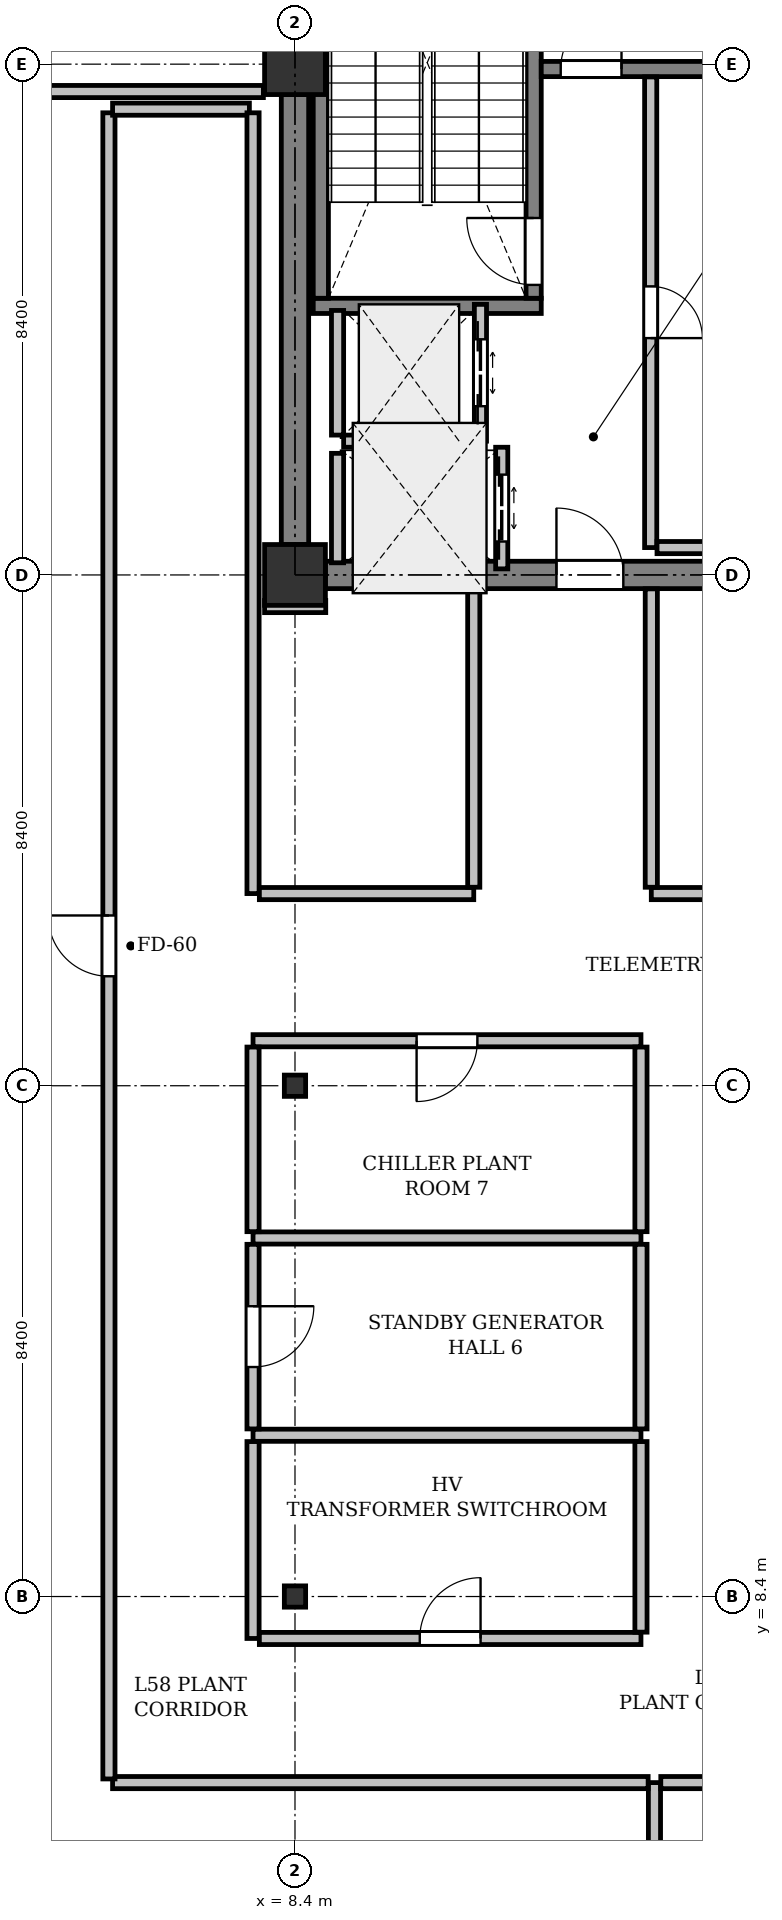
"""IFC4 building model, lengths in metres.
Left out: names, types, materials, properties, quantities, classifications, styles, units other than length and angle.
Written with IfcOpenShell. Run it as: python <this file> out.ifc"""

import sys

from ifc_helpers import new_model, si_unit, direction, frame, frame_2d, origin, origin_2d, place, context, subcontext, project, spatial, rectangle, i_section, extrude, element, fill, save


model = new_model("IFC4")
c1 = context("Model", 3, precision=1e-05, world=origin(), true_north=direction((0.0, 1.0)))
c2 = subcontext(c1, "Body", "Model", "MODEL_VIEW")
j1 = project(units=[si_unit("LENGTHUNIT", "METRE"), si_unit("PLANEANGLEUNIT", "RADIAN")], contexts=[c1])
p1 = place(None, origin())
s1 = spatial("IfcSite", under=j1, at=p1, CompositionType="ELEMENT")
p2 = place(p1, origin())
s2 = spatial("IfcBuilding", under=s1, at=p2, CompositionType="ELEMENT")
p3 = place(p2, frame((0.0, 0.0, 245.2)))
s3 = spatial("IfcBuildingStorey", under=s2, at=p3, CompositionType="ELEMENT", Elevation=245.2)
for number, where, z_axis, x_axis in (
    (1, (8.4, 8.4, 0.0), (0.0, 0.0, 1.0), (1.0, 0.0, 0.0)),
    (2, (8.4, 16.8, 0.0), (0.0, 0.0, 1.0), (1.0, 0.0, 0.0)),
):
    element("IfcColumn", number, at=place(p3, frame(where, z_axis=z_axis, x_axis=x_axis)), inside=s3, PredefinedType="COLUMN", context=c2, shape_type="SweptSolid", body=[
        extrude(i_section(OverallWidth=0.35, OverallDepth=0.35, WebThickness=0.02, FlangeThickness=0.032, at=origin_2d()), origin(), (0.0, 0.0, 1.0), 5.0),
    ])
for number, where, z_axis, x_axis in (
    (3, (8.4, 25.2, 0.0), (0.0, 0.0, 1.0), (1.0, 0.0, 0.0)),
    (4, (8.4, 33.6, 0.0), (0.0, 0.0, 1.0), (1.0, 0.0, 0.0)),
):
    element("IfcColumn", number, at=place(p3, frame(where, z_axis=z_axis, x_axis=x_axis)), inside=s3, PredefinedType="COLUMN", context=c2, shape_type="SweptSolid", body=[
        extrude(rectangle(XDim=1.0, YDim=1.0, at=origin_2d()), origin(), (0.0, 0.0, 1.0), 5.0),
    ])
p4 = place(p3, frame((8.4, 25.7, 0.0), z_axis=(0.0, 0.0, 1.0), x_axis=(0.0, 1.0, 0.0)))
e5 = element("IfcWall", 5, at=p4, inside=s3, PredefinedType="SHEAR", context=c2, shape_type="SweptSolid", body=[
    extrude(rectangle(XDim=7.4, YDim=0.45, at=frame_2d((3.7, 0.0))), origin(), (0.0, 0.0, 1.0), 4.725),
])
p5 = place(p3, frame((8.9, 25.2, 0.0), z_axis=(0.0, 0.0, 1.0), x_axis=(1.0, 0.0, 0.0)))
e6 = element("IfcWall", 6, at=p5, inside=s3, PredefinedType="SHEAR", context=c2, shape_type="SweptSolid", body=[
    extrude(rectangle(XDim=7.4, YDim=0.45, at=frame_2d((3.7, 0.0))), origin(), (0.0, 0.0, 1.0), 4.725),
])
p6 = place(p5, frame((3.8, 0.0, 0.0)))
e7 = element("IfcOpeningElement", 7, at=p6, cuts=e6, PredefinedType="OPENING", context=c2, shape_type="SweptSolid", body=[
    extrude(rectangle(XDim=1.1, YDim=2.15, at=frame_2d((0.55, 1.075))), frame((0.0, 0.235, 0.0), z_axis=(0.0, -1.0, 0.0), x_axis=(1.0, 0.0, 0.0)), (0.0, 0.0, 1.0), 0.47),
])
p7 = place(p3, frame((12.45, 29.625, 0.0), z_axis=(0.0, 0.0, 1.0), x_axis=(-1.0, 0.0, 0.0)))
e8 = element("IfcWall", 8, at=p7, inside=s3, PredefinedType="SHEAR", context=c2, shape_type="SweptSolid", body=[
    extrude(rectangle(XDim=3.75, YDim=0.25, at=frame_2d((1.875, 0.0))), origin(), (0.0, 0.0, 1.0), 4.725),
])
p8 = place(p3, frame((12.325, 29.75, 0.0), z_axis=(0.0, 0.0, 1.0), x_axis=(0.0, 1.0, 0.0)))
e9 = element("IfcWall", 9, at=p8, inside=s3, PredefinedType="SHEAR", context=c2, shape_type="SweptSolid", body=[
    extrude(rectangle(XDim=7.75, YDim=0.25, at=frame_2d((3.875, 0.0))), origin(), (0.0, 0.0, 1.0), 4.725),
])
p9 = place(p8, frame((0.22, 0.0, 0.0)))
e10 = element("IfcOpeningElement", 10, at=p9, cuts=e9, PredefinedType="OPENING", context=c2, shape_type="SweptSolid", body=[
    extrude(rectangle(XDim=1.1, YDim=2.15, at=frame_2d((0.55, 1.075))), frame((0.0, 0.135, 0.0), z_axis=(0.0, -1.0, 0.0), x_axis=(1.0, 0.0, 0.0)), (0.0, 0.0, 1.0), 0.27),
])
p10 = place(p3, frame((8.825, 29.75, 0.0), z_axis=(0.0, 0.0, 1.0), x_axis=(0.0, 1.0, 0.0)))
e11 = element("IfcWall", 11, at=p10, inside=s3, PredefinedType="SHEAR", context=c2, shape_type="SweptSolid", body=[
    extrude(rectangle(XDim=7.75, YDim=0.25, at=frame_2d((3.875, 0.0))), origin(), (0.0, 0.0, 1.0), 4.725),
])
p11 = place(p3, frame((12.45, 33.52, 0.0), z_axis=(0.0, 0.0, 1.0), x_axis=(1.0, 0.0, 0.0)))
e12 = element("IfcWall", 12, at=p11, inside=s3, PredefinedType="SHEAR", context=c2, shape_type="SweptSolid", body=[
    extrude(rectangle(XDim=3.85, YDim=0.25, at=frame_2d((1.925, 0.0))), origin(), (0.0, 0.0, 1.0), 4.725),
])
p12 = place(p11, frame((0.32, 0.0, 0.0)))
e13 = element("IfcOpeningElement", 13, at=p12, cuts=e12, PredefinedType="OPENING", context=c2, shape_type="SweptSolid", body=[
    extrude(rectangle(XDim=1.0, YDim=2.15, at=frame_2d((0.5, 1.075))), frame((0.0, 0.135, 0.0), z_axis=(0.0, -1.0, 0.0), x_axis=(1.0, 0.0, 0.0)), (0.0, 0.0, 1.0), 0.27),
])
p13 = place(p3, frame((11.45, 27.4, 0.0), z_axis=(0.0, 0.0, 1.0), x_axis=(0.0, 1.0, 0.0)))
e14 = element("IfcWall", 14, at=p13, inside=s3, PredefinedType="PARTITIONING", context=c2, shape_type="SweptSolid", body=[
    extrude(rectangle(XDim=2.25, YDim=0.2, at=frame_2d((1.125, 0.0))), origin(), (0.0, 0.0, 1.0), 4.725),
])
p14 = place(p13, frame((0.575, 0.0, 0.0)))
e15 = element("IfcOpeningElement", 15, at=p14, cuts=e14, PredefinedType="OPENING", context=c2, shape_type="SweptSolid", body=[
    extrude(rectangle(XDim=1.1, YDim=2.2, at=frame_2d((0.55, 1.1))), frame((0.0, 0.11, 0.0), z_axis=(0.0, -1.0, 0.0), x_axis=(1.0, 0.0, 0.0)), (0.0, 0.0, 1.0), 0.22),
])
p15 = place(p3, frame((9.1, 27.5, 0.0), z_axis=(0.0, 0.0, 1.0), x_axis=(0.0, 1.0, 0.0)))
e16 = element("IfcWall", 16, at=p15, inside=s3, PredefinedType="PARTITIONING", context=c2, shape_type="SweptSolid", body=[
    extrude(rectangle(XDim=2.05, YDim=0.2, at=frame_2d((1.025, 0.0))), origin(), (0.0, 0.0, 1.0), 4.725),
])
p16 = place(p3, frame((9.2, 27.4, 0.0), z_axis=(0.0, 0.0, 1.0), x_axis=(1.0, 0.0, 0.0)))
e17 = element("IfcWall", 17, at=p16, inside=s3, PredefinedType="PARTITIONING", context=c2, shape_type="SweptSolid", body=[
    extrude(rectangle(XDim=2.15, YDim=0.2, at=frame_2d((1.075, 0.0))), origin(), (0.0, 0.0, 1.0), 4.725),
])
p17 = place(p3, frame((11.8, 25.3, 0.0), z_axis=(0.0, 0.0, 1.0), x_axis=(0.0, 1.0, 0.0)))
e18 = element("IfcWall", 18, at=p17, inside=s3, PredefinedType="PARTITIONING", context=c2, shape_type="SweptSolid", body=[
    extrude(rectangle(XDim=2.0, YDim=0.2, at=frame_2d((1.0, 0.0))), origin(), (0.0, 0.0, 1.0), 4.725),
])
p18 = place(p17, frame((0.45, 0.0, 0.0)))
e19 = element("IfcOpeningElement", 19, at=p18, cuts=e18, PredefinedType="OPENING", context=c2, shape_type="SweptSolid", body=[
    extrude(rectangle(XDim=1.1, YDim=2.2, at=frame_2d((0.55, 1.1))), frame((0.0, 0.11, 0.0), z_axis=(0.0, -1.0, 0.0), x_axis=(1.0, 0.0, 0.0)), (0.0, 0.0, 1.0), 0.22),
])
p19 = place(p3, frame((9.1, 25.4, 0.0), z_axis=(0.0, 0.0, 1.0), x_axis=(0.0, 1.0, 0.0)))
e20 = element("IfcWall", 20, at=p19, inside=s3, PredefinedType="PARTITIONING", context=c2, shape_type="SweptSolid", body=[
    extrude(rectangle(XDim=1.8, YDim=0.2, at=frame_2d((0.9, 0.0))), origin(), (0.0, 0.0, 1.0), 4.725),
])
p20 = place(p3, frame((14.25, 33.39, 0.0), z_axis=(0.0, 0.0, 1.0), x_axis=(0.0, -1.0, 0.0)))
e21 = element("IfcWall", 21, at=p20, inside=s3, PredefinedType="PARTITIONING", context=c2, shape_type="SweptSolid", body=[
    extrude(rectangle(XDim=7.74, YDim=0.2, at=frame_2d((3.87, 0.0))), origin(), (0.0, 0.0, 1.0), 4.725),
])
p21 = place(p20, frame((3.445, 0.0, 0.0)))
e22 = element("IfcOpeningElement", 22, at=p21, cuts=e21, PredefinedType="OPENING", context=c2, shape_type="SweptSolid", body=[
    extrude(rectangle(XDim=0.85, YDim=2.15, at=frame_2d((0.425, 1.075))), frame((0.0, 0.11, 0.0), z_axis=(0.0, -1.0, 0.0), x_axis=(1.0, 0.0, 0.0)), (0.0, 0.0, 1.0), 0.22),
])
p22 = place(p3, frame((14.354, 25.65, 0.0), z_axis=(0.0, 0.0, 1.0), x_axis=(1.0, 0.0, 0.0)))
e23 = element("IfcWall", 23, at=p22, inside=s3, PredefinedType="PARTITIONING", context=c2, shape_type="SweptSolid", body=[
    extrude(rectangle(XDim=1.941, YDim=0.2, at=frame_2d((0.97, 0.0))), origin(), (0.0, 0.0, 1.0), 4.725),
])
p23 = place(p3, frame((14.312, 0.124, 0.0), z_axis=(0.0, 0.0, 1.0), x_axis=(0.0, 1.0, 0.0)))
e24 = element("IfcWall", 24, at=p23, inside=s3, PredefinedType="PARTITIONING", context=c2, shape_type="SweptSolid", body=[
    extrude(rectangle(XDim=5.216, YDim=0.2, at=frame_2d((2.608, 0.0))), origin(), (0.0, 0.0, 1.0), 4.725),
])
p24 = place(p3, frame((14.208, 5.34, 0.0), z_axis=(0.0, 0.0, 1.0), x_axis=(-1.0, 0.0, 0.0)))
e25 = element("IfcWall", 25, at=p24, inside=s3, PredefinedType="PARTITIONING", context=c2, shape_type="SweptSolid", body=[
    extrude(rectangle(XDim=8.808, YDim=0.2, at=frame_2d((4.404, 0.0))), origin(), (0.0, 0.0, 1.0), 3.709),
])
p25 = place(p3, frame((5.34, 5.4, 0.0), z_axis=(0.0, 0.0, 1.0), x_axis=(0.0, 1.0, 0.0)))
e26 = element("IfcWall", 26, at=p25, inside=s3, PredefinedType="PARTITIONING", context=c2, shape_type="SweptSolid", body=[
    extrude(rectangle(XDim=27.4, YDim=0.2, at=frame_2d((13.7, 0.0))), origin(), (0.0, 0.0, 1.0), 3.825),
])
p26 = place(p25, frame((13.2, 0.0, 0.0)))
e27 = element("IfcOpeningElement", 27, at=p26, cuts=e26, PredefinedType="OPENING", context=c2, shape_type="SweptSolid", body=[
    extrude(rectangle(XDim=1.0, YDim=2.15, at=frame_2d((0.5, 1.075))), frame((0.0, 0.11, 0.0), z_axis=(0.0, -1.0, 0.0), x_axis=(1.0, 0.0, 0.0)), (0.0, 0.0, 1.0), 0.22),
])
p27 = place(p3, frame((5.4, 32.86, 0.0), z_axis=(0.0, 0.0, 1.0), x_axis=(1.0, 0.0, 0.0)))
e28 = element("IfcWall", 28, at=p27, inside=s3, PredefinedType="PARTITIONING", context=c2, shape_type="SweptSolid", body=[
    extrude(rectangle(XDim=2.25, YDim=0.2, at=frame_2d((1.125, 0.0))), origin(), (0.0, 0.0, 1.0), 4.725),
])
p28 = place(p3, frame((7.71, 32.8, 0.0), z_axis=(0.0, 0.0, 1.0), x_axis=(0.0, -1.0, 0.0)))
e29 = element("IfcWall", 29, at=p28, inside=s3, PredefinedType="PARTITIONING", context=c2, shape_type="SweptSolid", body=[
    extrude(rectangle(XDim=12.84, YDim=0.2, at=frame_2d((6.42, 0.0))), origin(), (0.0, 0.0, 1.0), 3.825),
])
p29 = place(p3, frame((7.814, 19.96, 0.0), z_axis=(0.0, 0.0, 1.0), x_axis=(1.0, 0.0, 0.0)))
e30 = element("IfcWall", 30, at=p29, inside=s3, PredefinedType="PARTITIONING", context=c2, shape_type="SweptSolid", body=[
    extrude(rectangle(XDim=3.526, YDim=0.2, at=frame_2d((1.763, 0.0))), origin(), (0.0, 0.0, 1.0), 3.709),
])
p30 = place(p3, frame((11.34, 20.064, 0.0), z_axis=(0.0, 0.0, 1.0), x_axis=(0.0, 1.0, 0.0)))
e31 = element("IfcWall", 31, at=p30, inside=s3, PredefinedType="PARTITIONING", context=c2, shape_type="SweptSolid", body=[
    extrude(rectangle(XDim=4.907, YDim=0.2, at=frame_2d((2.454, 0.0))), origin(), (0.0, 0.0, 1.0), 4.725),
])
p31 = place(p3, frame((8.906, 24.681, 0.0), z_axis=(0.0, 0.0, 1.0), x_axis=(-0.999999528702, -0.000970873329, 0.0)))
e32 = element("IfcWall", 32, at=p31, inside=s3, PredefinedType="PARTITIONING", context=c2, shape_type="SweptSolid", body=[
    extrude(rectangle(XDim=1.006, YDim=0.2, at=frame_2d((0.503, 0.0))), origin(), (0.0, 0.0, 1.0), 3.709),
])
p32 = place(p3, frame((7.88, 33.15, 0.0), z_axis=(0.0, 0.0, 1.0), x_axis=(-1.0, 0.0, 0.0)))
e33 = element("IfcWall", 33, at=p32, inside=s3, PredefinedType="PARTITIONING", context=c2, shape_type="SweptSolid", body=[
    extrude(rectangle(XDim=7.756, YDim=0.2, at=frame_2d((3.878, 0.0))), origin(), (0.0, 0.0, 1.0), 4.322),
])
p33 = place(p3, frame((28.086, 5.34, 0.0), z_axis=(0.0, 0.0, 1.0), x_axis=(-1.0, 0.0, 0.0)))
e34 = element("IfcWall", 34, at=p33, inside=s3, PredefinedType="PARTITIONING", context=c2, shape_type="SweptSolid", body=[
    extrude(rectangle(XDim=13.67, YDim=0.2, at=frame_2d((6.835, 0.0))), origin(), (0.0, 0.0, 1.0), 3.709),
])
p34 = place(p33, frame((6.335, 0.0, 0.0)))
e35 = element("IfcOpeningElement", 35, at=p34, cuts=e34, PredefinedType="OPENING", context=c2, shape_type="SweptSolid", body=[
    extrude(rectangle(XDim=1.0, YDim=2.15, at=frame_2d((0.5, 1.075))), frame((0.0, 0.11, 0.0), z_axis=(0.0, -1.0, 0.0), x_axis=(1.0, 0.0, 0.0)), (0.0, 0.0, 1.0), 0.22),
])
p35 = place(p3, frame((14.09, 11.052, 0.0), z_axis=(0.0, 0.0, 1.0), x_axis=(-1.0, 0.0, 0.0)))
e36 = element("IfcWall", 36, at=p35, inside=s3, PredefinedType="PARTITIONING", context=c2, shape_type="SweptSolid", body=[
    extrude(rectangle(XDim=6.38, YDim=0.2, at=frame_2d((3.19, 0.0))), origin(), (0.0, 0.0, 1.0), 3.709),
])
p36 = place(p3, frame((7.71, 10.948, 0.0), z_axis=(0.0, 0.0, 1.0), x_axis=(0.0, -1.0, 0.0)))
e37 = element("IfcWall", 37, at=p36, inside=s3, PredefinedType="PARTITIONING", context=c2, shape_type="SweptSolid", body=[
    extrude(rectangle(XDim=3.238, YDim=0.2, at=frame_2d((1.619, 0.0))), origin(), (0.0, 0.0, 1.0), 3.825),
])
p37 = place(p3, frame((7.814, 7.71, 0.0), z_axis=(0.0, 0.0, 1.0), x_axis=(1.0, 0.0, 0.0)))
e38 = element("IfcWall", 38, at=p37, inside=s3, PredefinedType="PARTITIONING", context=c2, shape_type="SweptSolid", body=[
    extrude(rectangle(XDim=6.276, YDim=0.2, at=frame_2d((3.138, 0.0))), origin(), (0.0, 0.0, 1.0), 3.709),
])
p38 = place(p37, frame((2.638, 0.0, 0.0)))
e39 = element("IfcOpeningElement", 39, at=p38, cuts=e38, PredefinedType="OPENING", context=c2, shape_type="SweptSolid", body=[
    extrude(rectangle(XDim=1.0, YDim=2.15, at=frame_2d((0.5, 1.075))), frame((0.0, 0.11, 0.0), z_axis=(0.0, -1.0, 0.0), x_axis=(1.0, 0.0, 0.0)), (0.0, 0.0, 1.0), 0.22),
])
p39 = place(p3, frame((14.09, 7.814, 0.0), z_axis=(0.0, 0.0, 1.0), x_axis=(0.0, 1.0, 0.0)))
e40 = element("IfcWall", 40, at=p39, inside=s3, PredefinedType="PARTITIONING", context=c2, shape_type="SweptSolid", body=[
    extrude(rectangle(XDim=3.134, YDim=0.2, at=frame_2d((1.567, 0.0))), origin(), (0.0, 0.0, 1.0), 3.825),
])
p40 = place(p3, frame((14.09, 14.296, 0.0), z_axis=(0.0, 0.0, 1.0), x_axis=(-1.0, 0.0, 0.0)))
e41 = element("IfcWall", 41, at=p40, inside=s3, PredefinedType="PARTITIONING", context=c2, shape_type="SweptSolid", body=[
    extrude(rectangle(XDim=6.38, YDim=0.2, at=frame_2d((3.19, 0.0))), origin(), (0.0, 0.0, 1.0), 3.709),
])
p41 = place(p3, frame((7.71, 14.192, 0.0), z_axis=(0.0, 0.0, 1.0), x_axis=(0.0, -1.0, 0.0)))
e42 = element("IfcWall", 42, at=p41, inside=s3, PredefinedType="PARTITIONING", context=c2, shape_type="SweptSolid", body=[
    extrude(rectangle(XDim=3.036, YDim=0.2, at=frame_2d((1.518, 0.0))), origin(), (0.0, 0.0, 1.0), 4.725),
])
p42 = place(p41, frame((1.018, 0.0, 0.0)))
e43 = element("IfcOpeningElement", 43, at=p42, cuts=e42, PredefinedType="OPENING", context=c2, shape_type="SweptSolid", body=[
    extrude(rectangle(XDim=1.0, YDim=2.15, at=frame_2d((0.5, 1.075))), frame((0.0, 0.11, 0.0), z_axis=(0.0, -1.0, 0.0), x_axis=(1.0, 0.0, 0.0)), (0.0, 0.0, 1.0), 0.22),
])
p43 = place(p3, frame((14.09, 11.156, 0.0), z_axis=(0.0, 0.0, 1.0), x_axis=(0.0, 1.0, 0.0)))
e44 = element("IfcWall", 44, at=p43, inside=s3, PredefinedType="PARTITIONING", context=c2, shape_type="SweptSolid", body=[
    extrude(rectangle(XDim=3.036, YDim=0.2, at=frame_2d((1.518, 0.0))), origin(), (0.0, 0.0, 1.0), 4.725),
])
p44 = place(p3, frame((14.09, 17.54, 0.0), z_axis=(0.0, 0.0, 1.0), x_axis=(-1.0, 0.0, 0.0)))
e45 = element("IfcWall", 45, at=p44, inside=s3, PredefinedType="PARTITIONING", context=c2, shape_type="SweptSolid", body=[
    extrude(rectangle(XDim=6.38, YDim=0.2, at=frame_2d((3.19, 0.0))), origin(), (0.0, 0.0, 1.0), 3.709),
])
p45 = place(p44, frame((2.69, 0.0, 0.0)))
e46 = element("IfcOpeningElement", 46, at=p45, cuts=e45, PredefinedType="OPENING", context=c2, shape_type="SweptSolid", body=[
    extrude(rectangle(XDim=1.0, YDim=2.15, at=frame_2d((0.5, 1.075))), frame((0.0, 0.11, 0.0), z_axis=(0.0, -1.0, 0.0), x_axis=(1.0, 0.0, 0.0)), (0.0, 0.0, 1.0), 0.22),
])
for number, where, z_axis, x_axis in (
    (47, (7.71, 17.436, 0.0), (0.0, 0.0, 1.0), (0.0, -1.0, 0.0)),
    (48, (14.09, 14.4, 0.0), (0.0, 0.0, 1.0), (0.0, 1.0, 0.0)),
):
    element("IfcWall", number, at=place(p3, frame(where, z_axis=z_axis, x_axis=x_axis)), inside=s3, PredefinedType="PARTITIONING", context=c2, shape_type="SweptSolid", body=[
        extrude(rectangle(XDim=3.036, YDim=0.2, at=frame_2d((1.518, 0.0))), origin(), (0.0, 0.0, 1.0), 3.825),
    ])
p46 = place(p3, frame((14.26, 19.96, 0.0), z_axis=(0.0, 0.0, 1.0), x_axis=(1.0, 0.0, 0.0)))
e49 = element("IfcWall", 49, at=p46, inside=s3, PredefinedType="PARTITIONING", context=c2, shape_type="SweptSolid", body=[
    extrude(rectangle(XDim=3.28, YDim=0.2, at=frame_2d((1.64, 0.0))), origin(), (0.0, 0.0, 1.0), 3.709),
])
p47 = place(p3, frame((14.26, 24.971, 0.0), z_axis=(0.0, 0.0, 1.0), x_axis=(0.0, -1.0, 0.0)))
e50 = element("IfcWall", 50, at=p47, inside=s3, PredefinedType="PARTITIONING", context=c2, shape_type="SweptSolid", body=[
    extrude(rectangle(XDim=4.907, YDim=0.2, at=frame_2d((2.454, 0.0))), origin(), (0.0, 0.0, 1.0), 4.725),
])
p48 = place(p6, origin())
e51 = element("IfcDoor", 51, at=p48, inside=s3, OperationType="SINGLE_SWING_LEFT", PredefinedType="DOOR", context=c2, shape_type="SweptSolid", body=[
    extrude(rectangle(XDim=1.1, YDim=2.15, at=frame_2d((0.55, 1.075))), frame((0.0, 0.025, 0.0), z_axis=(0.0, -1.0, 0.0), x_axis=(1.0, 0.0, 0.0)), (0.0, 0.0, 1.0), 0.05),
])
fill(e7, e51)
p49 = place(p9, origin())
e52 = element("IfcDoor", 52, at=p49, inside=s3, OperationType="SINGLE_SWING_RIGHT", PredefinedType="DOOR", context=c2, shape_type="SweptSolid", body=[
    extrude(rectangle(XDim=1.1, YDim=2.15, at=frame_2d((0.55, 1.075))), frame((0.0, 0.025, 0.0), z_axis=(0.0, -1.0, 0.0), x_axis=(1.0, 0.0, 0.0)), (0.0, 0.0, 1.0), 0.05),
])
fill(e10, e52)
p50 = place(p12, origin())
e53 = element("IfcDoor", 53, at=p50, inside=s3, OperationType="SINGLE_SWING_RIGHT", PredefinedType="DOOR", context=c2, shape_type="SweptSolid", body=[
    extrude(rectangle(XDim=1.0, YDim=2.15, at=frame_2d((0.5, 1.075))), frame((0.0, 0.025, 0.0), z_axis=(0.0, -1.0, 0.0), x_axis=(1.0, 0.0, 0.0)), (0.0, 0.0, 1.0), 0.05),
])
fill(e13, e53)
p51 = place(p14, origin())
e54 = element("IfcDoor", 54, at=p51, inside=s3, OperationType="DOUBLE_DOOR_SLIDING", PredefinedType="DOOR", context=c2, shape_type="SweptSolid", body=[
    extrude(rectangle(XDim=1.1, YDim=2.2, at=frame_2d((0.55, 1.1))), frame((0.0, 0.025, 0.0), z_axis=(0.0, -1.0, 0.0), x_axis=(1.0, 0.0, 0.0)), (0.0, 0.0, 1.0), 0.05),
])
fill(e15, e54)
p52 = place(p18, origin())
e55 = element("IfcDoor", 55, at=p52, inside=s3, OperationType="DOUBLE_DOOR_SLIDING", PredefinedType="DOOR", context=c2, shape_type="SweptSolid", body=[
    extrude(rectangle(XDim=1.1, YDim=2.2, at=frame_2d((0.55, 1.1))), frame((0.0, 0.025, 0.0), z_axis=(0.0, -1.0, 0.0), x_axis=(1.0, 0.0, 0.0)), (0.0, 0.0, 1.0), 0.05),
])
fill(e19, e55)
p53 = place(p21, origin())
e56 = element("IfcDoor", 56, at=p53, inside=s3, OperationType="SINGLE_SWING_RIGHT", PredefinedType="DOOR", context=c2, shape_type="SweptSolid", body=[
    extrude(rectangle(XDim=0.85, YDim=2.15, at=frame_2d((0.425, 1.075))), frame((0.0, 0.025, 0.0), z_axis=(0.0, -1.0, 0.0), x_axis=(1.0, 0.0, 0.0)), (0.0, 0.0, 1.0), 0.05),
])
fill(e22, e56)
p54 = place(p26, origin())
e57 = element("IfcDoor", 57, at=p54, inside=s3, OperationType="SINGLE_SWING_RIGHT", PredefinedType="DOOR", context=c2, shape_type="SweptSolid", body=[
    extrude(rectangle(XDim=1.0, YDim=2.15, at=frame_2d((0.5, 1.075))), frame((0.0, 0.025, 0.0), z_axis=(0.0, -1.0, 0.0), x_axis=(1.0, 0.0, 0.0)), (0.0, 0.0, 1.0), 0.05),
])
fill(e27, e57)
p55 = place(p38, origin())
e58 = element("IfcDoor", 58, at=p55, inside=s3, OperationType="SINGLE_SWING_RIGHT", PredefinedType="DOOR", context=c2, shape_type="SweptSolid", body=[
    extrude(rectangle(XDim=1.0, YDim=2.15, at=frame_2d((0.5, 1.075))), frame((0.0, 0.025, 0.0), z_axis=(0.0, -1.0, 0.0), x_axis=(1.0, 0.0, 0.0)), (0.0, 0.0, 1.0), 0.05),
])
fill(e39, e58)
p56 = place(p42, origin())
e59 = element("IfcDoor", 59, at=p56, inside=s3, OperationType="SINGLE_SWING_LEFT", PredefinedType="DOOR", context=c2, shape_type="SweptSolid", body=[
    extrude(rectangle(XDim=1.0, YDim=2.15, at=frame_2d((0.5, 1.075))), frame((0.0, 0.025, 0.0), z_axis=(0.0, -1.0, 0.0), x_axis=(1.0, 0.0, 0.0)), (0.0, 0.0, 1.0), 0.05),
])
fill(e43, e59)
p57 = place(p45, origin())
e60 = element("IfcDoor", 60, at=p57, inside=s3, OperationType="SINGLE_SWING_RIGHT", PredefinedType="DOOR", context=c2, shape_type="SweptSolid", body=[
    extrude(rectangle(XDim=1.0, YDim=2.15, at=frame_2d((0.5, 1.075))), frame((0.0, 0.025, 0.0), z_axis=(0.0, -1.0, 0.0), x_axis=(1.0, 0.0, 0.0)), (0.0, 0.0, 1.0), 0.05),
])
fill(e46, e60)
save(model, sys.argv[1])
